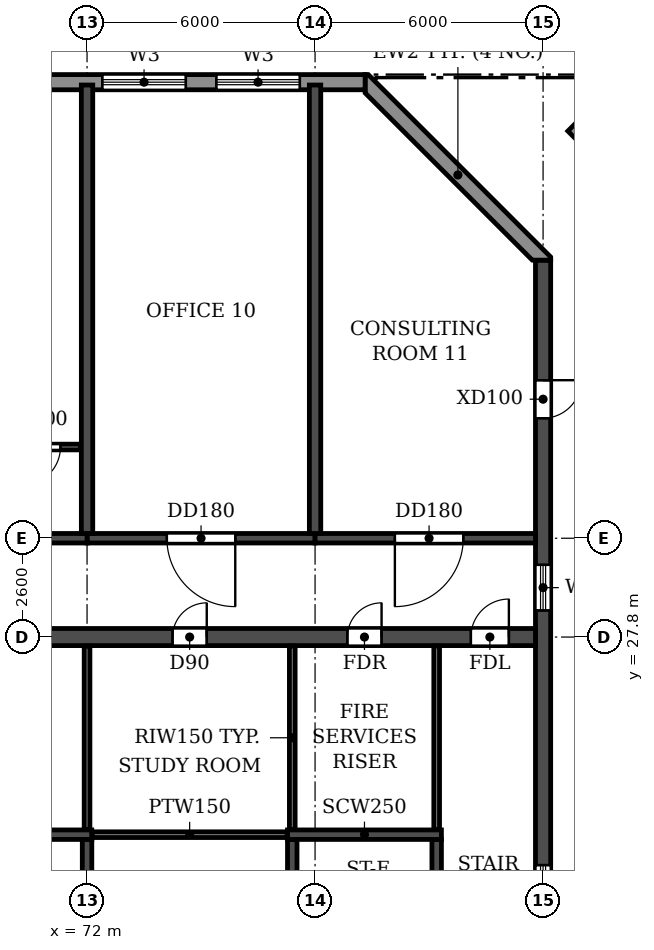
"""IFC4 building model, lengths in metres.
Left out: names, types, materials, properties, quantities, classifications, styles, units other than length and angle.
Written with IfcOpenShell. Run it as: python <this file> out.ifc"""

import sys

from ifc_helpers import new_model, si_unit, direction, frame, frame_2d, origin, place, context, subcontext, project, spatial, polyline, rectangle, outline, extrude, source, transform, mapped, element, fill, save


model = new_model("IFC4")
c1 = context("Model", 3, precision=1e-05, world=origin(), true_north=direction((0.0, 1.0)))
c2 = subcontext(c1, "Body", "Model", "MODEL_VIEW")
j1 = project(units=[si_unit("LENGTHUNIT", "METRE"), si_unit("PLANEANGLEUNIT", "RADIAN")], contexts=[c1])
p1 = place(None, origin())
s1 = spatial("IfcSite", under=j1, at=p1, CompositionType="ELEMENT")
p2 = place(p1, origin())
s2 = spatial("IfcBuilding", under=s1, at=p2, CompositionType="ELEMENT")
p3 = place(p2, frame((0.0, 0.0, 158.7)))
s3 = spatial("IfcBuildingStorey", under=s2, at=p3, CompositionType="ELEMENT", Elevation=158.7)
for number, where, z_axis, x_axis in (
    (1, (72.0, 30.525, 0.0), (0.0, 0.0, 1.0), (0.0, 1.0, 0.0)),
    (2, (78.0, 30.525, 0.0), (0.0, 0.0, 1.0), (0.0, 1.0, 0.0)),
):
    element("IfcWall", number, at=place(p3, frame(where, z_axis=z_axis, x_axis=x_axis)), inside=s3, PredefinedType="SHEAR", context=c2, shape_type="SweptSolid", body=[
        extrude(rectangle(XDim=11.8, YDim=0.3, at=frame_2d((5.9, 0.0))), origin(), (0.0, 0.0, 1.0), 3.07),
    ])
p4 = place(p3, frame((84.0, 4.683, 0.0), z_axis=(0.0, 0.0, 1.0), x_axis=(0.0, 1.0, 0.0)))
e3 = element("IfcWall", 3, at=p4, inside=s3, PredefinedType="SHEAR", context=c2, shape_type="SweptSolid", body=[
    extrude(rectangle(XDim=33.034, YDim=0.4, at=frame_2d((16.517, 0.0))), origin(), (0.0, 0.0, 1.0), 3.07),
])
p5 = place(p4, frame((23.817, 0.0, 0.9)))
e4 = element("IfcOpeningElement", 4, at=p5, cuts=e3, PredefinedType="OPENING", context=c2, shape_type="SweptSolid", body=[
    extrude(rectangle(XDim=1.2, YDim=1.5, at=frame_2d((0.6, 0.75))), frame((0.0, 0.21, 0.0), z_axis=(0.0, -1.0, 0.0), x_axis=(1.0, 0.0, 0.0)), (0.0, 0.0, 1.0), 0.42),
])
p6 = place(p4, frame((8.017, 0.0, 0.9)))
e5 = element("IfcOpeningElement", 5, at=p6, cuts=e3, PredefinedType="OPENING", context=c2, shape_type="SweptSolid", body=[
    extrude(rectangle(XDim=1.2, YDim=1.5, at=frame_2d((0.6, 0.75))), frame((0.0, 0.21, 0.0), z_axis=(0.0, -1.0, 0.0), x_axis=(1.0, 0.0, 0.0)), (0.0, 0.0, 1.0), 0.42),
])
p7 = place(p4, frame((15.917, 0.0, 0.9)))
e6 = element("IfcOpeningElement", 6, at=p7, cuts=e3, PredefinedType="OPENING", context=c2, shape_type="SweptSolid", body=[
    extrude(rectangle(XDim=1.2, YDim=1.5, at=frame_2d((0.6, 0.75))), frame((0.0, 0.21, 0.0), z_axis=(0.0, -1.0, 0.0), x_axis=(1.0, 0.0, 0.0)), (0.0, 0.0, 1.0), 0.42),
])
p8 = place(p4, frame((28.876, 0.0, 0.0)))
e7 = element("IfcOpeningElement", 7, at=p8, cuts=e3, PredefinedType="OPENING", context=c2, shape_type="SweptSolid", body=[
    extrude(rectangle(XDim=1.0, YDim=2.1, at=frame_2d((0.5, 1.05))), frame((0.0, 0.21, 0.0), z_axis=(0.0, -1.0, 0.0), x_axis=(1.0, 0.0, 0.0)), (0.0, 0.0, 1.0), 0.42),
])
p9 = place(p4, frame((5.617, 0.0, 0.0)))
e8 = element("IfcOpeningElement", 8, at=p9, cuts=e3, PredefinedType="OPENING", context=c2, shape_type="SweptSolid", body=[
    extrude(rectangle(XDim=1.0, YDim=2.1, at=frame_2d((0.5, 1.05))), frame((0.0, 0.21, 0.0), z_axis=(0.0, -1.0, 0.0), x_axis=(1.0, 0.0, 0.0)), (0.0, 0.0, 1.0), 0.42),
])
p10 = place(p3, frame((66.0, 30.4, 0.0), z_axis=(0.0, 0.0, 1.0), x_axis=(1.0, 0.0, 0.0)))
e9 = element("IfcWall", 9, at=p10, inside=s3, PredefinedType="SHEAR", context=c2, shape_type="SweptSolid", body=[
    extrude(rectangle(XDim=6.0, YDim=0.25, at=frame_2d((3.0, 0.0))), origin(), (0.0, 0.0, 1.0), 2.47),
])
p11 = place(p10, frame((2.55, 0.0, 0.0)))
e10 = element("IfcOpeningElement", 10, at=p11, cuts=e9, PredefinedType="OPENING", context=c2, shape_type="SweptSolid", body=[
    extrude(rectangle(XDim=0.9, YDim=2.1, at=frame_2d((0.45, 1.05))), frame((0.0, 0.135, 0.0), z_axis=(0.0, -1.0, 0.0), x_axis=(1.0, 0.0, 0.0)), (0.0, 0.0, 1.0), 0.27),
])
p12 = place(p3, frame((72.0, 30.4, 0.0), z_axis=(0.0, 0.0, 1.0), x_axis=(1.0, 0.0, 0.0)))
e11 = element("IfcWall", 11, at=p12, inside=s3, PredefinedType="SHEAR", context=c2, shape_type="SweptSolid", body=[
    extrude(rectangle(XDim=6.0, YDim=0.25, at=frame_2d((3.0, 0.0))), origin(), (0.0, 0.0, 1.0), 2.47),
])
p13 = place(p12, frame((2.1, 0.0, 0.0)))
e12 = element("IfcOpeningElement", 12, at=p13, cuts=e11, PredefinedType="OPENING", context=c2, shape_type="SweptSolid", body=[
    extrude(rectangle(XDim=1.8, YDim=2.1, at=frame_2d((0.9, 1.05))), frame((0.0, 0.135, 0.0), z_axis=(0.0, -1.0, 0.0), x_axis=(1.0, 0.0, 0.0)), (0.0, 0.0, 1.0), 0.27),
])
p14 = place(p3, frame((78.0, 30.4, 0.0), z_axis=(0.0, 0.0, 1.0), x_axis=(1.0, 0.0, 0.0)))
e13 = element("IfcWall", 13, at=p14, inside=s3, PredefinedType="SHEAR", context=c2, shape_type="SweptSolid", body=[
    extrude(rectangle(XDim=5.8, YDim=0.25, at=frame_2d((2.9, 0.0))), origin(), (0.0, 0.0, 1.0), 2.47),
])
p15 = place(p14, frame((2.1, 0.0, 0.0)))
e14 = element("IfcOpeningElement", 14, at=p15, cuts=e13, PredefinedType="OPENING", context=c2, shape_type="SweptSolid", body=[
    extrude(rectangle(XDim=1.8, YDim=2.1, at=frame_2d((0.9, 1.05))), frame((0.0, 0.135, 0.0), z_axis=(0.0, -1.0, 0.0), x_axis=(1.0, 0.0, 0.0)), (0.0, 0.0, 1.0), 0.27),
])
p16 = place(p3, frame((18.2, 27.8, 0.0), z_axis=(0.0, 0.0, 1.0), x_axis=(1.0, 0.0, 0.0)))
e15 = element("IfcWall", 15, at=p16, inside=s3, PredefinedType="SOLIDWALL", context=c2, shape_type="SweptSolid", body=[
    extrude(rectangle(XDim=65.6, YDim=0.45, at=frame_2d((32.8, 0.0))), origin(), (0.0, 0.0, 1.0), 3.07),
])
p17 = place(p16, frame((0.7, 0.0, 0.0)))
e16 = element("IfcOpeningElement", 16, at=p17, cuts=e15, PredefinedType="OPENING", context=c2, shape_type="SweptSolid", body=[
    extrude(rectangle(XDim=1.0, YDim=2.1, at=frame_2d((0.5, 1.05))), frame((0.0, 0.235, 0.0), z_axis=(0.0, -1.0, 0.0), x_axis=(1.0, 0.0, 0.0)), (0.0, 0.0, 1.0), 0.47),
])
p18 = place(p16, frame((4.05, 0.0, 0.0)))
e17 = element("IfcOpeningElement", 17, at=p18, cuts=e15, PredefinedType="OPENING", context=c2, shape_type="SweptSolid", body=[
    extrude(rectangle(XDim=0.9, YDim=2.1, at=frame_2d((0.45, 1.05))), frame((0.0, 0.235, 0.0), z_axis=(0.0, -1.0, 0.0), x_axis=(1.0, 0.0, 0.0)), (0.0, 0.0, 1.0), 0.47),
])
p19 = place(p16, frame((8.65, 0.0, 0.0)))
e18 = element("IfcOpeningElement", 18, at=p19, cuts=e15, PredefinedType="OPENING", context=c2, shape_type="SweptSolid", body=[
    extrude(rectangle(XDim=0.9, YDim=2.1, at=frame_2d((0.45, 1.05))), frame((0.0, 0.235, 0.0), z_axis=(0.0, -1.0, 0.0), x_axis=(1.0, 0.0, 0.0)), (0.0, 0.0, 1.0), 0.47),
])
p20 = place(p16, frame((13.25, 0.0, 0.0)))
e19 = element("IfcOpeningElement", 19, at=p20, cuts=e15, PredefinedType="OPENING", context=c2, shape_type="SweptSolid", body=[
    extrude(rectangle(XDim=0.9, YDim=2.1, at=frame_2d((0.45, 1.05))), frame((0.0, 0.235, 0.0), z_axis=(0.0, -1.0, 0.0), x_axis=(1.0, 0.0, 0.0)), (0.0, 0.0, 1.0), 0.47),
])
p21 = place(p16, frame((19.0, 0.0, 0.0)))
e20 = element("IfcOpeningElement", 20, at=p21, cuts=e15, PredefinedType="OPENING", context=c2, shape_type="SweptSolid", body=[
    extrude(rectangle(XDim=1.0, YDim=2.1, at=frame_2d((0.5, 1.05))), frame((0.0, 0.235, 0.0), z_axis=(0.0, -1.0, 0.0), x_axis=(1.0, 0.0, 0.0)), (0.0, 0.0, 1.0), 0.47),
])
p22 = place(p16, frame((24.2, 0.0, 0.0)))
e21 = element("IfcOpeningElement", 21, at=p22, cuts=e15, PredefinedType="OPENING", context=c2, shape_type="SweptSolid", body=[
    extrude(rectangle(XDim=1.0, YDim=2.1, at=frame_2d((0.5, 1.05))), frame((0.0, 0.235, 0.0), z_axis=(0.0, -1.0, 0.0), x_axis=(1.0, 0.0, 0.0)), (0.0, 0.0, 1.0), 0.47),
])
p23 = place(p16, frame((29.4, 0.0, 0.0)))
e22 = element("IfcOpeningElement", 22, at=p23, cuts=e15, PredefinedType="OPENING", context=c2, shape_type="SweptSolid", body=[
    extrude(rectangle(XDim=1.0, YDim=2.1, at=frame_2d((0.5, 1.05))), frame((0.0, 0.235, 0.0), z_axis=(0.0, -1.0, 0.0), x_axis=(1.0, 0.0, 0.0)), (0.0, 0.0, 1.0), 0.47),
])
p24 = place(p16, frame((32.3, 0.0, 0.0)))
e23 = element("IfcOpeningElement", 23, at=p24, cuts=e15, PredefinedType="OPENING", context=c2, shape_type="SweptSolid", body=[
    extrude(rectangle(XDim=1.0, YDim=2.1, at=frame_2d((0.5, 1.05))), frame((0.0, 0.235, 0.0), z_axis=(0.0, -1.0, 0.0), x_axis=(1.0, 0.0, 0.0)), (0.0, 0.0, 1.0), 0.47),
])
p25 = place(p16, frame((35.2, 0.0, 0.0)))
e24 = element("IfcOpeningElement", 24, at=p25, cuts=e15, PredefinedType="OPENING", context=c2, shape_type="SweptSolid", body=[
    extrude(rectangle(XDim=1.0, YDim=2.1, at=frame_2d((0.5, 1.05))), frame((0.0, 0.235, 0.0), z_axis=(0.0, -1.0, 0.0), x_axis=(1.0, 0.0, 0.0)), (0.0, 0.0, 1.0), 0.47),
])
p26 = place(p16, frame((37.8, 0.0, 0.0)))
e25 = element("IfcOpeningElement", 25, at=p26, cuts=e15, PredefinedType="OPENING", context=c2, shape_type="SweptSolid", body=[
    extrude(rectangle(XDim=1.0, YDim=2.1, at=frame_2d((0.5, 1.05))), frame((0.0, 0.235, 0.0), z_axis=(0.0, -1.0, 0.0), x_axis=(1.0, 0.0, 0.0)), (0.0, 0.0, 1.0), 0.47),
])
p27 = place(p16, frame((40.4, 0.0, 0.0)))
e26 = element("IfcOpeningElement", 26, at=p27, cuts=e15, PredefinedType="OPENING", context=c2, shape_type="SweptSolid", body=[
    extrude(rectangle(XDim=1.0, YDim=2.1, at=frame_2d((0.5, 1.05))), frame((0.0, 0.235, 0.0), z_axis=(0.0, -1.0, 0.0), x_axis=(1.0, 0.0, 0.0)), (0.0, 0.0, 1.0), 0.47),
])
p28 = place(p16, frame((43.0, 0.0, 0.0)))
e27 = element("IfcOpeningElement", 27, at=p28, cuts=e15, PredefinedType="OPENING", context=c2, shape_type="SweptSolid", body=[
    extrude(rectangle(XDim=1.0, YDim=2.1, at=frame_2d((0.5, 1.05))), frame((0.0, 0.235, 0.0), z_axis=(0.0, -1.0, 0.0), x_axis=(1.0, 0.0, 0.0)), (0.0, 0.0, 1.0), 0.47),
])
p29 = place(p16, frame((46.9, 0.0, 0.0)))
e28 = element("IfcOpeningElement", 28, at=p29, cuts=e15, PredefinedType="OPENING", context=c2, shape_type="SweptSolid", body=[
    extrude(rectangle(XDim=1.0, YDim=2.1, at=frame_2d((0.5, 1.05))), frame((0.0, 0.235, 0.0), z_axis=(0.0, -1.0, 0.0), x_axis=(1.0, 0.0, 0.0)), (0.0, 0.0, 1.0), 0.47),
])
p30 = place(p16, frame((51.45, 0.0, 0.0)))
e29 = element("IfcOpeningElement", 29, at=p30, cuts=e15, PredefinedType="OPENING", context=c2, shape_type="SweptSolid", body=[
    extrude(rectangle(XDim=0.9, YDim=2.1, at=frame_2d((0.45, 1.05))), frame((0.0, 0.235, 0.0), z_axis=(0.0, -1.0, 0.0), x_axis=(1.0, 0.0, 0.0)), (0.0, 0.0, 1.0), 0.47),
])
p31 = place(p16, frame((56.05, 0.0, 0.0)))
e30 = element("IfcOpeningElement", 30, at=p31, cuts=e15, PredefinedType="OPENING", context=c2, shape_type="SweptSolid", body=[
    extrude(rectangle(XDim=0.9, YDim=2.1, at=frame_2d((0.45, 1.05))), frame((0.0, 0.235, 0.0), z_axis=(0.0, -1.0, 0.0), x_axis=(1.0, 0.0, 0.0)), (0.0, 0.0, 1.0), 0.47),
])
p32 = place(p16, frame((60.65, 0.0, 0.0)))
e31 = element("IfcOpeningElement", 31, at=p32, cuts=e15, PredefinedType="OPENING", context=c2, shape_type="SweptSolid", body=[
    extrude(rectangle(XDim=0.9, YDim=2.1, at=frame_2d((0.45, 1.05))), frame((0.0, 0.235, 0.0), z_axis=(0.0, -1.0, 0.0), x_axis=(1.0, 0.0, 0.0)), (0.0, 0.0, 1.0), 0.47),
])
p33 = place(p16, frame((63.9, 0.0, 0.0)))
e32 = element("IfcOpeningElement", 32, at=p33, cuts=e15, PredefinedType="OPENING", context=c2, shape_type="SweptSolid", body=[
    extrude(rectangle(XDim=1.0, YDim=2.1, at=frame_2d((0.5, 1.05))), frame((0.0, 0.235, 0.0), z_axis=(0.0, -1.0, 0.0), x_axis=(1.0, 0.0, 0.0)), (0.0, 0.0, 1.0), 0.47),
])
p34 = place(p3, frame((72.0, 14.825, 0.0), z_axis=(0.0, 0.0, 1.0), x_axis=(0.0, 1.0, 0.0)))
e33 = element("IfcWall", 33, at=p34, inside=s3, PredefinedType="SOLIDWALL", context=c2, shape_type="SweptSolid", body=[
    extrude(rectangle(XDim=7.65, YDim=0.25, at=frame_2d((3.825, 0.0))), origin(), (0.0, 0.0, 1.0), 3.07),
])
p35 = place(p3, frame((68.075, 22.6, 0.0), z_axis=(0.0, 0.0, 1.0), x_axis=(1.0, 0.0, 0.0)))
e34 = element("IfcWall", 34, at=p35, inside=s3, PredefinedType="SOLIDWALL", context=c2, shape_type="SweptSolid", body=[
    extrude(rectangle(XDim=4.05, YDim=0.25, at=frame_2d((2.025, 0.0))), origin(), (0.0, 0.0, 1.0), 3.07),
])
p36 = place(p3, frame((77.4, 14.825, 0.0), z_axis=(0.0, 0.0, 1.0), x_axis=(0.0, 1.0, 0.0)))
e35 = element("IfcWall", 35, at=p36, inside=s3, PredefinedType="SOLIDWALL", context=c2, shape_type="SweptSolid", body=[
    extrude(rectangle(XDim=7.65, YDim=0.25, at=frame_2d((3.825, 0.0))), origin(), (0.0, 0.0, 1.0), 3.07),
])
p37 = place(p3, frame((81.2, 14.825, 0.0), z_axis=(0.0, 0.0, 1.0), x_axis=(0.0, 1.0, 0.0)))
e36 = element("IfcWall", 36, at=p37, inside=s3, PredefinedType="SOLIDWALL", context=c2, shape_type="SweptSolid", body=[
    extrude(rectangle(XDim=7.65, YDim=0.25, at=frame_2d((3.825, 0.0))), origin(), (0.0, 0.0, 1.0), 3.07),
])
p38 = place(p37, frame((0.475, 0.0, 0.0)))
e37 = element("IfcOpeningElement", 37, at=p38, cuts=e36, PredefinedType="OPENING", context=c2, shape_type="SweptSolid", body=[
    extrude(rectangle(XDim=1.0, YDim=2.1, at=frame_2d((0.5, 1.05))), frame((0.0, 0.135, 0.0), z_axis=(0.0, -1.0, 0.0), x_axis=(1.0, 0.0, 0.0)), (0.0, 0.0, 1.0), 0.27),
])
p39 = place(p3, frame((77.275, 22.6, 0.0), z_axis=(0.0, 0.0, 1.0), x_axis=(1.0, 0.0, 0.0)))
e38 = element("IfcWall", 38, at=p39, inside=s3, PredefinedType="SOLIDWALL", context=c2, shape_type="SweptSolid", body=[
    extrude(rectangle(XDim=4.05, YDim=0.25, at=frame_2d((2.025, 0.0))), origin(), (0.0, 0.0, 1.0), 3.07),
])
p40 = place(p3, origin())
e39 = element("IfcWall", 39, at=p40, inside=s3, PredefinedType="STANDARD", context=c2, shape_type="SweptSolid", body=[
    extrude(outline(polyline([(84.2, 37.717), (84.2, 37.8), (79.4, 42.6), (79.317, 42.6), (79.317, 42.117), (83.717, 37.717), (84.2, 37.717)])), origin(), (0.0, 0.0, 1.0), 3.07),
])
p41 = place(p3, frame((79.317, 42.4, 0.0), z_axis=(0.0, 0.0, 1.0), x_axis=(-1.0, 0.0, 0.0)))
e40 = element("IfcWall", 40, at=p41, inside=s3, PredefinedType="STANDARD", context=c2, shape_type="SweptSolid", body=[
    extrude(rectangle(XDim=25.317, YDim=0.4, at=frame_2d((12.659, 0.0))), origin(), (0.0, 0.0, 1.0), 3.07),
])
p42 = place(p41, frame((4.717, 0.0, 0.6)))
e41 = element("IfcOpeningElement", 41, at=p42, cuts=e40, PredefinedType="OPENING", context=c2, shape_type="SweptSolid", body=[
    extrude(rectangle(XDim=2.2, YDim=1.8, at=frame_2d((1.1, 0.9))), frame((0.0, 0.21, 0.0), z_axis=(0.0, -1.0, 0.0), x_axis=(1.0, 0.0, 0.0)), (0.0, 0.0, 1.0), 0.42),
])
p43 = place(p41, frame((1.717, 0.0, 0.6)))
e42 = element("IfcOpeningElement", 42, at=p43, cuts=e40, PredefinedType="OPENING", context=c2, shape_type="SweptSolid", body=[
    extrude(rectangle(XDim=2.2, YDim=1.8, at=frame_2d((1.1, 0.9))), frame((0.0, 0.21, 0.0), z_axis=(0.0, -1.0, 0.0), x_axis=(1.0, 0.0, 0.0)), (0.0, 0.0, 1.0), 0.42),
])
m1 = source(origin(), c2, "Body", "SweptSolid", [
    extrude(outline(polyline([(0.0, 0.0), (2.546, -2.546), (3.394, -1.697), (0.849, 0.848), (0.0, 0.0)])), origin(), (0.0, 0.0, 1.0), 0.6),
])
p44 = place(p3, frame((84.652, 41.114, 0.0)))
e43 = element("IfcWall", 43, at=p44, inside=s3, PredefinedType="USERDEFINED", context=c2, shape_type="MappedRepresentation", body=[
    mapped(m1, transform((0.0, 0.0, 0.0))),
])
p45 = place(p3, frame((66.16, 32.8, 0.0), z_axis=(0.0, 0.0, 1.0), x_axis=(1.0, 0.0, 0.0)))
e44 = element("IfcWall", 44, at=p45, inside=s3, PredefinedType="PARTITIONING", context=c2, shape_type="SweptSolid", body=[
    extrude(rectangle(XDim=5.68, YDim=0.15, at=frame_2d((2.84, 0.0))), origin(), (0.0, 0.0, 1.0), 3.07),
])
p46 = place(p45, frame((1.14, 0.0, 0.0)))
e45 = element("IfcOpeningElement", 45, at=p46, cuts=e44, PredefinedType="OPENING", context=c2, shape_type="SweptSolid", body=[
    extrude(rectangle(XDim=1.0, YDim=2.1, at=frame_2d((0.5, 1.05))), frame((0.0, 0.085, 0.0), z_axis=(0.0, -1.0, 0.0), x_axis=(1.0, 0.0, 0.0)), (0.0, 0.0, 1.0), 0.17),
])
p47 = place(p45, frame((4.14, 0.0, 0.0)))
e46 = element("IfcOpeningElement", 46, at=p47, cuts=e44, PredefinedType="OPENING", context=c2, shape_type="SweptSolid", body=[
    extrude(rectangle(XDim=1.0, YDim=2.1, at=frame_2d((0.5, 1.05))), frame((0.0, 0.085, 0.0), z_axis=(0.0, -1.0, 0.0), x_axis=(1.0, 0.0, 0.0)), (0.0, 0.0, 1.0), 0.17),
])
p48 = place(p3, frame((72.135, 22.6, 0.0), z_axis=(0.0, 0.0, 1.0), x_axis=(1.0, 0.0, 0.0)))
e47 = element("IfcWall", 47, at=p48, inside=s3, PredefinedType="PARTITIONING", context=c2, shape_type="SweptSolid", body=[
    extrude(rectangle(XDim=5.13, YDim=0.15, at=frame_2d((2.565, 0.0))), origin(), (0.0, 0.0, 1.0), 3.07),
])
for number, where, z_axis, x_axis in (
    (48, (72.0, 22.735, 0.0), (0.0, 0.0, 1.0), (0.0, 1.0, 0.0)),
    (49, (77.4, 22.735, 0.0), (0.0, 0.0, 1.0), (0.0, 1.0, 0.0)),
    (50, (81.2, 22.735, 0.0), (0.0, 0.0, 1.0), (0.0, 1.0, 0.0)),
):
    element("IfcWall", number, at=place(p3, frame(where, z_axis=z_axis, x_axis=x_axis)), inside=s3, PredefinedType="PARTITIONING", context=c2, shape_type="SweptSolid", body=[
        extrude(rectangle(XDim=4.83, YDim=0.15, at=frame_2d((2.415, 0.0))), origin(), (0.0, 0.0, 1.0), 3.07),
    ])
p49 = place(p5, origin())
e51 = element("IfcWindow", 51, at=p49, inside=s3, PartitioningType="SINGLE_PANEL", PredefinedType="WINDOW", context=c2, shape_type="SweptSolid", body=[
    extrude(rectangle(XDim=1.2, YDim=1.5, at=frame_2d((0.6, 0.75))), frame((0.0, 0.03, 0.0), z_axis=(0.0, -1.0, 0.0), x_axis=(1.0, 0.0, 0.0)), (0.0, 0.0, 1.0), 0.06),
])
fill(e4, e51)
p50 = place(p7, origin())
e52 = element("IfcWindow", 52, at=p50, inside=s3, PartitioningType="SINGLE_PANEL", PredefinedType="WINDOW", context=c2, shape_type="SweptSolid", body=[
    extrude(rectangle(XDim=1.2, YDim=1.5, at=frame_2d((0.6, 0.75))), frame((0.0, 0.03, 0.0), z_axis=(0.0, -1.0, 0.0), x_axis=(1.0, 0.0, 0.0)), (0.0, 0.0, 1.0), 0.06),
])
fill(e6, e52)
p51 = place(p42, origin())
e53 = element("IfcWindow", 53, at=p51, inside=s3, PartitioningType="DOUBLE_PANEL_HORIZONTAL", PredefinedType="WINDOW", context=c2, shape_type="SweptSolid", body=[
    extrude(rectangle(XDim=2.2, YDim=1.8, at=frame_2d((1.1, 0.9))), frame((0.0, 0.03, 0.0), z_axis=(0.0, -1.0, 0.0), x_axis=(1.0, 0.0, 0.0)), (0.0, 0.0, 1.0), 0.06),
])
fill(e41, e53)
p52 = place(p43, origin())
e54 = element("IfcWindow", 54, at=p52, inside=s3, PartitioningType="DOUBLE_PANEL_HORIZONTAL", PredefinedType="WINDOW", context=c2, shape_type="SweptSolid", body=[
    extrude(rectangle(XDim=2.2, YDim=1.8, at=frame_2d((1.1, 0.9))), frame((0.0, 0.03, 0.0), z_axis=(0.0, -1.0, 0.0), x_axis=(1.0, 0.0, 0.0)), (0.0, 0.0, 1.0), 0.06),
])
fill(e42, e54)
p53 = place(p31, origin())
e55 = element("IfcDoor", 55, at=p53, inside=s3, OperationType="SINGLE_SWING_RIGHT", PredefinedType="DOOR", context=c2, shape_type="SweptSolid", body=[
    extrude(rectangle(XDim=0.9, YDim=2.1, at=frame_2d((0.45, 1.05))), frame((0.0, 0.025, 0.0), z_axis=(0.0, -1.0, 0.0), x_axis=(1.0, 0.0, 0.0)), (0.0, 0.0, 1.0), 0.05),
])
fill(e30, e55)
p54 = place(p13, frame((1.8, 0.0, 0.0), z_axis=(0.0, 0.0, 1.0), x_axis=(-1.0, 0.0, 0.0)))
e56 = element("IfcDoor", 56, at=p54, inside=s3, OperationType="DOUBLE_DOOR_SINGLE_SWING", PredefinedType="DOOR", context=c2, shape_type="SweptSolid", body=[
    extrude(rectangle(XDim=1.8, YDim=2.1, at=frame_2d((0.9, 1.05))), frame((0.0, 0.025, 0.0), z_axis=(0.0, -1.0, 0.0), x_axis=(1.0, 0.0, 0.0)), (0.0, 0.0, 1.0), 0.05),
])
fill(e12, e56)
p55 = place(p32, origin())
e57 = element("IfcDoor", 57, at=p55, inside=s3, OperationType="SINGLE_SWING_RIGHT", PredefinedType="DOOR", context=c2, shape_type="SweptSolid", body=[
    extrude(rectangle(XDim=0.9, YDim=2.1, at=frame_2d((0.45, 1.05))), frame((0.0, 0.025, 0.0), z_axis=(0.0, -1.0, 0.0), x_axis=(1.0, 0.0, 0.0)), (0.0, 0.0, 1.0), 0.05),
])
fill(e31, e57)
p56 = place(p15, frame((1.8, 0.0, 0.0), z_axis=(0.0, 0.0, 1.0), x_axis=(-1.0, 0.0, 0.0)))
e58 = element("IfcDoor", 58, at=p56, inside=s3, OperationType="DOUBLE_DOOR_SINGLE_SWING", PredefinedType="DOOR", context=c2, shape_type="SweptSolid", body=[
    extrude(rectangle(XDim=1.8, YDim=2.1, at=frame_2d((0.9, 1.05))), frame((0.0, 0.025, 0.0), z_axis=(0.0, -1.0, 0.0), x_axis=(1.0, 0.0, 0.0)), (0.0, 0.0, 1.0), 0.05),
])
fill(e14, e58)
p57 = place(p33, origin())
e59 = element("IfcDoor", 59, at=p57, inside=s3, OperationType="SINGLE_SWING_RIGHT", PredefinedType="DOOR", context=c2, shape_type="SweptSolid", body=[
    extrude(rectangle(XDim=1.0, YDim=2.1, at=frame_2d((0.5, 1.05))), frame((0.0, 0.025, 0.0), z_axis=(0.0, -1.0, 0.0), x_axis=(1.0, 0.0, 0.0)), (0.0, 0.0, 1.0), 0.05),
])
fill(e32, e59)
p58 = place(p47, frame((1.0, 0.0, 0.0), z_axis=(0.0, 0.0, 1.0), x_axis=(-1.0, 0.0, 0.0)))
e60 = element("IfcDoor", 60, at=p58, inside=s3, OperationType="SINGLE_SWING_RIGHT", PredefinedType="DOOR", context=c2, shape_type="SweptSolid", body=[
    extrude(rectangle(XDim=1.0, YDim=2.1, at=frame_2d((0.5, 1.05))), frame((0.0, 0.025, 0.0), z_axis=(0.0, -1.0, 0.0), x_axis=(1.0, 0.0, 0.0)), (0.0, 0.0, 1.0), 0.05),
])
fill(e46, e60)
p59 = place(p8, frame((1.0, 0.0, 0.0), z_axis=(0.0, 0.0, 1.0), x_axis=(-1.0, 0.0, 0.0)))
e61 = element("IfcDoor", 61, at=p59, inside=s3, OperationType="SINGLE_SWING_LEFT", PredefinedType="DOOR", context=c2, shape_type="SweptSolid", body=[
    extrude(rectangle(XDim=1.0, YDim=2.1, at=frame_2d((0.5, 1.05))), frame((0.0, 0.025, 0.0), z_axis=(0.0, -1.0, 0.0), x_axis=(1.0, 0.0, 0.0)), (0.0, 0.0, 1.0), 0.05),
])
fill(e7, e61)
save(model, sys.argv[1])
